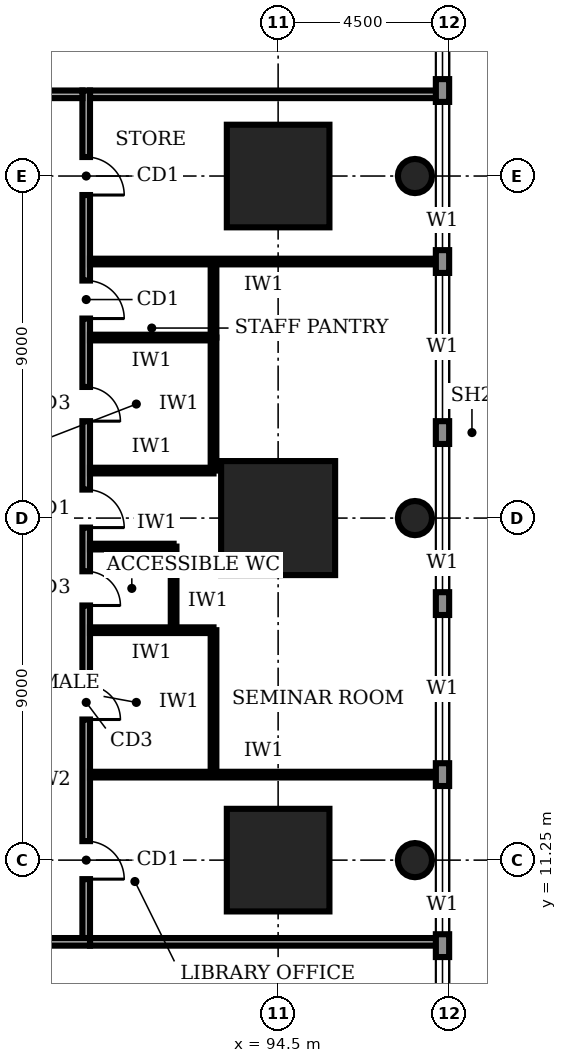
"""IFC4 building model, lengths in metres.
Left out: names, types, materials, properties, quantities, classifications, styles, units other than length and angle.
Written with IfcOpenShell. Run it as: python <this file> out.ifc"""

import sys

from ifc_helpers import new_model, si_unit, direction, frame, frame_2d, origin, origin_2d, place, context, subcontext, project, spatial, rectangle, circle, extrude, element, fill, save


model = new_model("IFC4")
c1 = context("Model", 3, precision=1e-05, world=origin(), true_north=direction((0.0, 1.0)))
c2 = subcontext(c1, "Body", "Model", "MODEL_VIEW")
j1 = project(units=[si_unit("LENGTHUNIT", "METRE"), si_unit("PLANEANGLEUNIT", "RADIAN")], contexts=[c1])
p1 = place(None, origin())
s1 = spatial("IfcSite", under=j1, at=p1, CompositionType="ELEMENT")
p2 = place(p1, origin())
s2 = spatial("IfcBuilding", under=s1, at=p2, CompositionType="ELEMENT")
p3 = place(p2, frame((0.0, 0.0, 11.0)))
s3 = spatial("IfcBuildingStorey", under=s2, at=p3, CompositionType="ELEMENT", Elevation=11.0)
p4 = place(p3, frame((94.5, 11.25, 0.0), z_axis=(0.0, 0.0, 1.0), x_axis=(1.0, 0.0, 0.0)))
e1 = element("IfcColumn", 1, at=p4, inside=s3, PredefinedType="COLUMN", context=c2, shape_type="SweptSolid", body=[
    extrude(rectangle(XDim=2.7, YDim=2.7, at=origin_2d()), origin(), (0.0, 0.0, 1.0), 5.0),
])
p5 = place(p3, frame((94.5, 20.25, 0.0), z_axis=(0.0, 0.0, 1.0), x_axis=(1.0, 0.0, 0.0)))
e2 = element("IfcColumn", 2, at=p5, inside=s3, PredefinedType="COLUMN", context=c2, shape_type="SweptSolid", body=[
    extrude(rectangle(XDim=3.0, YDim=3.0, at=origin_2d()), origin(), (0.0, 0.0, 1.0), 5.0),
])
p6 = place(p3, frame((94.5, 29.25, 0.0), z_axis=(0.0, 0.0, 1.0), x_axis=(1.0, 0.0, 0.0)))
e3 = element("IfcColumn", 3, at=p6, inside=s3, PredefinedType="COLUMN", context=c2, shape_type="SweptSolid", body=[
    extrude(rectangle(XDim=2.7, YDim=2.7, at=origin_2d()), origin(), (0.0, 0.0, 1.0), 5.0),
])
for number, where, z_axis, x_axis in (
    (4, (98.1, 11.25, 0.0), (0.0, 0.0, 1.0), (1.0, 0.0, 0.0)),
    (5, (98.1, 20.25, 0.0), (0.0, 0.0, 1.0), (1.0, 0.0, 0.0)),
    (6, (98.1, 29.25, 0.0), (0.0, 0.0, 1.0), (1.0, 0.0, 0.0)),
):
    element("IfcColumn", number, at=place(p3, frame(where, z_axis=z_axis, x_axis=x_axis)), inside=s3, PredefinedType="COLUMN", context=c2, shape_type="SweptSolid", body=[
        extrude(circle(Radius=0.45, at=origin_2d()), origin(), (0.0, 0.0, 1.0), 5.0),
    ])
p7 = place(p3, frame((98.825, -4.48, 0.0), z_axis=(0.0, 0.0, 1.0), x_axis=(0.0, 1.0, 0.0)))
e7 = element("IfcWall", 7, at=p7, inside=s3, PredefinedType="STANDARD", context=c2, shape_type="SweptSolid", body=[
    extrude(rectangle(XDim=53.96, YDim=0.35, at=frame_2d((26.98, 0.0))), origin(), (0.0, 0.0, 1.0), 4.7),
])
p8 = place(p7, frame((4.78, 0.0, 0.9)))
e8 = element("IfcOpeningElement", 8, at=p8, cuts=e7, PredefinedType="OPENING", context=c2, shape_type="SweptSolid", body=[
    extrude(rectangle(XDim=3.9, YDim=2.2, at=frame_2d((1.95, 1.1))), frame((0.0, 0.185, 0.0), z_axis=(0.0, -1.0, 0.0), x_axis=(1.0, 0.0, 0.0)), (0.0, 0.0, 1.0), 0.37),
])
p9 = place(p7, frame((9.28, 0.0, 0.9)))
e9 = element("IfcOpeningElement", 9, at=p9, cuts=e7, PredefinedType="OPENING", context=c2, shape_type="SweptSolid", body=[
    extrude(rectangle(XDim=3.9, YDim=2.2, at=frame_2d((1.95, 1.1))), frame((0.0, 0.185, 0.0), z_axis=(0.0, -1.0, 0.0), x_axis=(1.0, 0.0, 0.0)), (0.0, 0.0, 1.0), 0.37),
])
p10 = place(p7, frame((13.78, 0.0, 0.9)))
e10 = element("IfcOpeningElement", 10, at=p10, cuts=e7, PredefinedType="OPENING", context=c2, shape_type="SweptSolid", body=[
    extrude(rectangle(XDim=3.9, YDim=2.2, at=frame_2d((1.95, 1.1))), frame((0.0, 0.185, 0.0), z_axis=(0.0, -1.0, 0.0), x_axis=(1.0, 0.0, 0.0)), (0.0, 0.0, 1.0), 0.37),
])
p11 = place(p7, frame((18.28, 0.0, 0.9)))
e11 = element("IfcOpeningElement", 11, at=p11, cuts=e7, PredefinedType="OPENING", context=c2, shape_type="SweptSolid", body=[
    extrude(rectangle(XDim=3.9, YDim=2.2, at=frame_2d((1.95, 1.1))), frame((0.0, 0.185, 0.0), z_axis=(0.0, -1.0, 0.0), x_axis=(1.0, 0.0, 0.0)), (0.0, 0.0, 1.0), 0.37),
])
p12 = place(p7, frame((22.78, 0.0, 0.9)))
e12 = element("IfcOpeningElement", 12, at=p12, cuts=e7, PredefinedType="OPENING", context=c2, shape_type="SweptSolid", body=[
    extrude(rectangle(XDim=3.9, YDim=2.2, at=frame_2d((1.95, 1.1))), frame((0.0, 0.185, 0.0), z_axis=(0.0, -1.0, 0.0), x_axis=(1.0, 0.0, 0.0)), (0.0, 0.0, 1.0), 0.37),
])
p13 = place(p7, frame((27.28, 0.0, 0.9)))
e13 = element("IfcOpeningElement", 13, at=p13, cuts=e7, PredefinedType="OPENING", context=c2, shape_type="SweptSolid", body=[
    extrude(rectangle(XDim=3.9, YDim=2.2, at=frame_2d((1.95, 1.1))), frame((0.0, 0.185, 0.0), z_axis=(0.0, -1.0, 0.0), x_axis=(1.0, 0.0, 0.0)), (0.0, 0.0, 1.0), 0.37),
])
p14 = place(p7, frame((31.78, 0.0, 0.9)))
e14 = element("IfcOpeningElement", 14, at=p14, cuts=e7, PredefinedType="OPENING", context=c2, shape_type="SweptSolid", body=[
    extrude(rectangle(XDim=3.9, YDim=2.2, at=frame_2d((1.95, 1.1))), frame((0.0, 0.185, 0.0), z_axis=(0.0, -1.0, 0.0), x_axis=(1.0, 0.0, 0.0)), (0.0, 0.0, 1.0), 0.37),
])
p15 = place(p7, frame((36.28, 0.0, 0.9)))
e15 = element("IfcOpeningElement", 15, at=p15, cuts=e7, PredefinedType="OPENING", context=c2, shape_type="SweptSolid", body=[
    extrude(rectangle(XDim=3.9, YDim=2.2, at=frame_2d((1.95, 1.1))), frame((0.0, 0.185, 0.0), z_axis=(0.0, -1.0, 0.0), x_axis=(1.0, 0.0, 0.0)), (0.0, 0.0, 1.0), 0.37),
])
p16 = place(p7, frame((40.78, 0.0, 0.9)))
e16 = element("IfcOpeningElement", 16, at=p16, cuts=e7, PredefinedType="OPENING", context=c2, shape_type="SweptSolid", body=[
    extrude(rectangle(XDim=3.9, YDim=2.2, at=frame_2d((1.95, 1.1))), frame((0.0, 0.185, 0.0), z_axis=(0.0, -1.0, 0.0), x_axis=(1.0, 0.0, 0.0)), (0.0, 0.0, 1.0), 0.37),
])
p17 = place(p7, frame((45.28, 0.0, 0.9)))
e17 = element("IfcOpeningElement", 17, at=p17, cuts=e7, PredefinedType="OPENING", context=c2, shape_type="SweptSolid", body=[
    extrude(rectangle(XDim=3.9, YDim=2.2, at=frame_2d((1.95, 1.1))), frame((0.0, 0.185, 0.0), z_axis=(0.0, -1.0, 0.0), x_axis=(1.0, 0.0, 0.0)), (0.0, 0.0, 1.0), 0.37),
])
p18 = place(p7, frame((49.71, 0.0, 0.9)))
e18 = element("IfcOpeningElement", 18, at=p18, cuts=e7, PredefinedType="OPENING", context=c2, shape_type="SweptSolid", body=[
    extrude(rectangle(XDim=3.9, YDim=2.2, at=frame_2d((1.95, 1.1))), frame((0.0, 0.185, 0.0), z_axis=(0.0, -1.0, 0.0), x_axis=(1.0, 0.0, 0.0)), (0.0, 0.0, 1.0), 0.37),
])
p19 = place(p3, frame((72.65, 9.1, 0.0), z_axis=(0.0, 0.0, 1.0), x_axis=(1.0, 0.0, 0.0)))
e19 = element("IfcWall", 19, at=p19, inside=s3, PredefinedType="SOLIDWALL", context=c2, shape_type="SweptSolid", body=[
    extrude(rectangle(XDim=16.9, YDim=0.2, at=frame_2d((8.45, 0.0))), origin(), (0.0, 0.0, 1.0), 4.7),
])
p20 = place(p19, frame((3.175, 0.0, 0.0)))
e20 = element("IfcOpeningElement", 20, at=p20, cuts=e19, PredefinedType="OPENING", context=c2, shape_type="SweptSolid", body=[
    extrude(rectangle(XDim=1.8, YDim=2.1, at=frame_2d((0.9, 1.05))), frame((0.0, 0.11, 0.0), z_axis=(0.0, -1.0, 0.0), x_axis=(1.0, 0.0, 0.0)), (0.0, 0.0, 1.0), 0.22),
])
p21 = place(p19, frame((10.1, 0.0, 0.0)))
e21 = element("IfcOpeningElement", 21, at=p21, cuts=e19, PredefinedType="OPENING", context=c2, shape_type="SweptSolid", body=[
    extrude(rectangle(XDim=1.0, YDim=2.1, at=frame_2d((0.5, 1.05))), frame((0.0, 0.11, 0.0), z_axis=(0.0, -1.0, 0.0), x_axis=(1.0, 0.0, 0.0)), (0.0, 0.0, 1.0), 0.22),
])
p22 = place(p19, frame((13.975, 0.0, 0.0)))
e22 = element("IfcOpeningElement", 22, at=p22, cuts=e19, PredefinedType="OPENING", context=c2, shape_type="SweptSolid", body=[
    extrude(rectangle(XDim=1.8, YDim=2.1, at=frame_2d((0.9, 1.05))), frame((0.0, 0.11, 0.0), z_axis=(0.0, -1.0, 0.0), x_axis=(1.0, 0.0, 0.0)), (0.0, 0.0, 1.0), 0.22),
])
p23 = place(p3, frame((89.45, 9.2, 0.0), z_axis=(0.0, 0.0, 1.0), x_axis=(0.0, 1.0, 0.0)))
e23 = element("IfcWall", 23, at=p23, inside=s3, PredefinedType="SOLIDWALL", context=c2, shape_type="SweptSolid", body=[
    extrude(rectangle(XDim=22.3, YDim=0.2, at=frame_2d((11.15, 0.0))), origin(), (0.0, 0.0, 1.0), 4.7),
])
p24 = place(p23, frame((1.55, 0.0, 0.0)))
e24 = element("IfcOpeningElement", 24, at=p24, cuts=e23, PredefinedType="OPENING", context=c2, shape_type="SweptSolid", body=[
    extrude(rectangle(XDim=1.0, YDim=2.1, at=frame_2d((0.5, 1.05))), frame((0.0, 0.11, 0.0), z_axis=(0.0, -1.0, 0.0), x_axis=(1.0, 0.0, 0.0)), (0.0, 0.0, 1.0), 0.22),
])
p25 = place(p23, frame((5.75, 0.0, 0.0)))
e25 = element("IfcOpeningElement", 25, at=p25, cuts=e23, PredefinedType="OPENING", context=c2, shape_type="SweptSolid", body=[
    extrude(rectangle(XDim=0.9, YDim=2.1, at=frame_2d((0.45, 1.05))), frame((0.0, 0.11, 0.0), z_axis=(0.0, -1.0, 0.0), x_axis=(1.0, 0.0, 0.0)), (0.0, 0.0, 1.0), 0.22),
])
p26 = place(p23, frame((8.75, 0.0, 0.0)))
e26 = element("IfcOpeningElement", 26, at=p26, cuts=e23, PredefinedType="OPENING", context=c2, shape_type="SweptSolid", body=[
    extrude(rectangle(XDim=0.9, YDim=2.1, at=frame_2d((0.45, 1.05))), frame((0.0, 0.11, 0.0), z_axis=(0.0, -1.0, 0.0), x_axis=(1.0, 0.0, 0.0)), (0.0, 0.0, 1.0), 0.22),
])
p27 = place(p23, frame((13.6, 0.0, 0.0)))
e27 = element("IfcOpeningElement", 27, at=p27, cuts=e23, PredefinedType="OPENING", context=c2, shape_type="SweptSolid", body=[
    extrude(rectangle(XDim=0.9, YDim=2.1, at=frame_2d((0.45, 1.05))), frame((0.0, 0.11, 0.0), z_axis=(0.0, -1.0, 0.0), x_axis=(1.0, 0.0, 0.0)), (0.0, 0.0, 1.0), 0.22),
])
p28 = place(p23, frame((16.3, 0.0, 0.0)))
e28 = element("IfcOpeningElement", 28, at=p28, cuts=e23, PredefinedType="OPENING", context=c2, shape_type="SweptSolid", body=[
    extrude(rectangle(XDim=1.0, YDim=2.1, at=frame_2d((0.5, 1.05))), frame((0.0, 0.11, 0.0), z_axis=(0.0, -1.0, 0.0), x_axis=(1.0, 0.0, 0.0)), (0.0, 0.0, 1.0), 0.22),
])
p29 = place(p23, frame((10.8, 0.0, 0.0)))
e29 = element("IfcOpeningElement", 29, at=p29, cuts=e23, PredefinedType="OPENING", context=c2, shape_type="SweptSolid", body=[
    extrude(rectangle(XDim=1.0, YDim=2.1, at=frame_2d((0.5, 1.05))), frame((0.0, 0.11, 0.0), z_axis=(0.0, -1.0, 0.0), x_axis=(1.0, 0.0, 0.0)), (0.0, 0.0, 1.0), 0.22),
])
p30 = place(p23, frame((19.55, 0.0, 0.0)))
e30 = element("IfcOpeningElement", 30, at=p30, cuts=e23, PredefinedType="OPENING", context=c2, shape_type="SweptSolid", body=[
    extrude(rectangle(XDim=1.0, YDim=2.1, at=frame_2d((0.5, 1.05))), frame((0.0, 0.11, 0.0), z_axis=(0.0, -1.0, 0.0), x_axis=(1.0, 0.0, 0.0)), (0.0, 0.0, 1.0), 0.22),
])
p31 = place(p3, frame((89.35, 31.4, 0.0), z_axis=(0.0, 0.0, 1.0), x_axis=(-1.0, 0.0, 0.0)))
e31 = element("IfcWall", 31, at=p31, inside=s3, PredefinedType="SOLIDWALL", context=c2, shape_type="SweptSolid", body=[
    extrude(rectangle(XDim=16.9, YDim=0.2, at=frame_2d((8.45, 0.0))), origin(), (0.0, 0.0, 1.0), 4.7),
])
p32 = place(p31, frame((13.925, 0.0, 0.0)))
e32 = element("IfcOpeningElement", 32, at=p32, cuts=e31, PredefinedType="OPENING", context=c2, shape_type="SweptSolid", body=[
    extrude(rectangle(XDim=1.8, YDim=2.1, at=frame_2d((0.9, 1.05))), frame((0.0, 0.11, 0.0), z_axis=(0.0, -1.0, 0.0), x_axis=(1.0, 0.0, 0.0)), (0.0, 0.0, 1.0), 0.22),
])
p33 = place(p31, frame((10.1, 0.0, 0.0)))
e33 = element("IfcOpeningElement", 33, at=p33, cuts=e31, PredefinedType="OPENING", context=c2, shape_type="SweptSolid", body=[
    extrude(rectangle(XDim=1.0, YDim=2.1, at=frame_2d((0.5, 1.05))), frame((0.0, 0.11, 0.0), z_axis=(0.0, -1.0, 0.0), x_axis=(1.0, 0.0, 0.0)), (0.0, 0.0, 1.0), 0.22),
])
p34 = place(p31, frame((0.925, 0.0, 0.0)))
e34 = element("IfcOpeningElement", 34, at=p34, cuts=e31, PredefinedType="OPENING", context=c2, shape_type="SweptSolid", body=[
    extrude(rectangle(XDim=1.8, YDim=2.1, at=frame_2d((0.9, 1.05))), frame((0.0, 0.11, 0.0), z_axis=(0.0, -1.0, 0.0), x_axis=(1.0, 0.0, 0.0)), (0.0, 0.0, 1.0), 0.22),
])
p35 = place(p31, frame((5.6, 0.0, 0.0)))
e35 = element("IfcOpeningElement", 35, at=p35, cuts=e31, PredefinedType="OPENING", context=c2, shape_type="SweptSolid", body=[
    extrude(rectangle(XDim=1.0, YDim=2.1, at=frame_2d((0.5, 1.05))), frame((0.0, 0.11, 0.0), z_axis=(0.0, -1.0, 0.0), x_axis=(1.0, 0.0, 0.0)), (0.0, 0.0, 1.0), 0.22),
])
for number, where, z_axis, x_axis in (
    (36, (89.55, 9.1, 0.0), (0.0, 0.0, 1.0), (1.0, 0.0, 0.0)),
    (37, (89.55, 31.4, 0.0), (0.0, 0.0, 1.0), (1.0, 0.0, 0.0)),
):
    element("IfcWall", number, at=place(p3, frame(where, z_axis=z_axis, x_axis=x_axis)), inside=s3, PredefinedType="SOLIDWALL", context=c2, shape_type="SweptSolid", body=[
        extrude(rectangle(XDim=9.15, YDim=0.2, at=frame_2d((4.575, 0.0))), origin(), (0.0, 0.0, 1.0), 4.7),
    ])
for number, where, z_axis, x_axis in (
    (38, (89.55, 13.5, 0.0), (0.0, 0.0, 1.0), (1.0, 0.0, 0.0)),
    (39, (89.55, 27.0, 0.0), (0.0, 0.0, 1.0), (1.0, 0.0, 0.0)),
):
    element("IfcWall", number, at=place(p3, frame(where, z_axis=z_axis, x_axis=x_axis)), inside=s3, PredefinedType="PARTITIONING", context=c2, shape_type="SweptSolid", body=[
        extrude(rectangle(XDim=9.15, YDim=0.15, at=frame_2d((4.575, 0.0))), origin(), (0.0, 0.0, 1.0), 4.7),
    ])
p36 = place(p3, frame((89.55, 17.3, 0.0), z_axis=(0.0, 0.0, 1.0), x_axis=(1.0, 0.0, 0.0)))
e40 = element("IfcWall", 40, at=p36, inside=s3, PredefinedType="PARTITIONING", context=c2, shape_type="SweptSolid", body=[
    extrude(rectangle(XDim=3.25, YDim=0.15, at=frame_2d((1.625, 0.0))), origin(), (0.0, 0.0, 1.0), 4.7),
])
p37 = place(p3, frame((89.55, 19.5, 0.0), z_axis=(0.0, 0.0, 1.0), x_axis=(1.0, 0.0, 0.0)))
e41 = element("IfcWall", 41, at=p37, inside=s3, PredefinedType="PARTITIONING", context=c2, shape_type="SweptSolid", body=[
    extrude(rectangle(XDim=2.2, YDim=0.15, at=frame_2d((1.1, 0.0))), origin(), (0.0, 0.0, 1.0), 4.7),
])
for number, where, z_axis, x_axis in (
    (42, (89.55, 21.5, 0.0), (0.0, 0.0, 1.0), (1.0, 0.0, 0.0)),
    (43, (89.55, 25.0, 0.0), (0.0, 0.0, 1.0), (1.0, 0.0, 0.0)),
):
    element("IfcWall", number, at=place(p3, frame(where, z_axis=z_axis, x_axis=x_axis)), inside=s3, PredefinedType="PARTITIONING", context=c2, shape_type="SweptSolid", body=[
        extrude(rectangle(XDim=3.25, YDim=0.15, at=frame_2d((1.625, 0.0))), origin(), (0.0, 0.0, 1.0), 4.7),
    ])
p38 = place(p3, frame((92.8, 13.5, 0.0), z_axis=(0.0, 0.0, 1.0), x_axis=(0.0, 1.0, 0.0)))
e44 = element("IfcWall", 44, at=p38, inside=s3, PredefinedType="PARTITIONING", context=c2, shape_type="SweptSolid", body=[
    extrude(rectangle(XDim=3.8, YDim=0.15, at=frame_2d((1.9, 0.0))), origin(), (0.0, 0.0, 1.0), 4.7),
])
p39 = place(p3, frame((91.75, 17.3, 0.0), z_axis=(0.0, 0.0, 1.0), x_axis=(0.0, 1.0, 0.0)))
e45 = element("IfcWall", 45, at=p39, inside=s3, PredefinedType="PARTITIONING", context=c2, shape_type="SweptSolid", body=[
    extrude(rectangle(XDim=2.2, YDim=0.15, at=frame_2d((1.1, 0.0))), origin(), (0.0, 0.0, 1.0), 4.7),
])
p40 = place(p3, frame((92.8, 21.5, 0.0), z_axis=(0.0, 0.0, 1.0), x_axis=(0.0, 1.0, 0.0)))
e46 = element("IfcWall", 46, at=p40, inside=s3, PredefinedType="PARTITIONING", context=c2, shape_type="SweptSolid", body=[
    extrude(rectangle(XDim=3.5, YDim=0.15, at=frame_2d((1.75, 0.0))), origin(), (0.0, 0.0, 1.0), 4.7),
])
p41 = place(p3, frame((92.8, 25.0, 0.0), z_axis=(0.0, 0.0, 1.0), x_axis=(0.0, 1.0, 0.0)))
e47 = element("IfcWall", 47, at=p41, inside=s3, PredefinedType="PARTITIONING", context=c2, shape_type="SweptSolid", body=[
    extrude(rectangle(XDim=2.0, YDim=0.15, at=frame_2d((1.0, 0.0))), origin(), (0.0, 0.0, 1.0), 4.7),
])
p42 = place(p9, origin())
e48 = element("IfcWindow", 48, at=p42, inside=s3, PartitioningType="SINGLE_PANEL", PredefinedType="WINDOW", context=c2, shape_type="SweptSolid", body=[
    extrude(rectangle(XDim=3.9, YDim=2.2, at=frame_2d((1.95, 1.1))), frame((0.0, 0.03, 0.0), z_axis=(0.0, -1.0, 0.0), x_axis=(1.0, 0.0, 0.0)), (0.0, 0.0, 1.0), 0.06),
])
fill(e9, e48)
p43 = place(p10, origin())
e49 = element("IfcWindow", 49, at=p43, inside=s3, PartitioningType="SINGLE_PANEL", PredefinedType="WINDOW", context=c2, shape_type="SweptSolid", body=[
    extrude(rectangle(XDim=3.9, YDim=2.2, at=frame_2d((1.95, 1.1))), frame((0.0, 0.03, 0.0), z_axis=(0.0, -1.0, 0.0), x_axis=(1.0, 0.0, 0.0)), (0.0, 0.0, 1.0), 0.06),
])
fill(e10, e49)
p44 = place(p11, origin())
e50 = element("IfcWindow", 50, at=p44, inside=s3, PartitioningType="SINGLE_PANEL", PredefinedType="WINDOW", context=c2, shape_type="SweptSolid", body=[
    extrude(rectangle(XDim=3.9, YDim=2.2, at=frame_2d((1.95, 1.1))), frame((0.0, 0.03, 0.0), z_axis=(0.0, -1.0, 0.0), x_axis=(1.0, 0.0, 0.0)), (0.0, 0.0, 1.0), 0.06),
])
fill(e11, e50)
p45 = place(p12, origin())
e51 = element("IfcWindow", 51, at=p45, inside=s3, PartitioningType="SINGLE_PANEL", PredefinedType="WINDOW", context=c2, shape_type="SweptSolid", body=[
    extrude(rectangle(XDim=3.9, YDim=2.2, at=frame_2d((1.95, 1.1))), frame((0.0, 0.03, 0.0), z_axis=(0.0, -1.0, 0.0), x_axis=(1.0, 0.0, 0.0)), (0.0, 0.0, 1.0), 0.06),
])
fill(e12, e51)
p46 = place(p13, origin())
e52 = element("IfcWindow", 52, at=p46, inside=s3, PartitioningType="SINGLE_PANEL", PredefinedType="WINDOW", context=c2, shape_type="SweptSolid", body=[
    extrude(rectangle(XDim=3.9, YDim=2.2, at=frame_2d((1.95, 1.1))), frame((0.0, 0.03, 0.0), z_axis=(0.0, -1.0, 0.0), x_axis=(1.0, 0.0, 0.0)), (0.0, 0.0, 1.0), 0.06),
])
fill(e13, e52)
p47 = place(p14, origin())
e53 = element("IfcWindow", 53, at=p47, inside=s3, PartitioningType="SINGLE_PANEL", PredefinedType="WINDOW", context=c2, shape_type="SweptSolid", body=[
    extrude(rectangle(XDim=3.9, YDim=2.2, at=frame_2d((1.95, 1.1))), frame((0.0, 0.03, 0.0), z_axis=(0.0, -1.0, 0.0), x_axis=(1.0, 0.0, 0.0)), (0.0, 0.0, 1.0), 0.06),
])
fill(e14, e53)
p48 = place(p15, origin())
e54 = element("IfcWindow", 54, at=p48, inside=s3, PartitioningType="SINGLE_PANEL", PredefinedType="WINDOW", context=c2, shape_type="SweptSolid", body=[
    extrude(rectangle(XDim=3.9, YDim=2.2, at=frame_2d((1.95, 1.1))), frame((0.0, 0.03, 0.0), z_axis=(0.0, -1.0, 0.0), x_axis=(1.0, 0.0, 0.0)), (0.0, 0.0, 1.0), 0.06),
])
fill(e15, e54)
p49 = place(p24, frame((1.0, 0.0, 0.0), z_axis=(0.0, 0.0, 1.0), x_axis=(-1.0, 0.0, 0.0)))
e55 = element("IfcDoor", 55, at=p49, inside=s3, OperationType="SINGLE_SWING_RIGHT", PredefinedType="DOOR", context=c2, shape_type="SweptSolid", body=[
    extrude(rectangle(XDim=1.0, YDim=2.1, at=frame_2d((0.5, 1.05))), frame((0.0, 0.025, 0.0), z_axis=(0.0, -1.0, 0.0), x_axis=(1.0, 0.0, 0.0)), (0.0, 0.0, 1.0), 0.05),
])
fill(e24, e55)
p50 = place(p25, frame((0.9, 0.0, 0.0), z_axis=(0.0, 0.0, 1.0), x_axis=(-1.0, 0.0, 0.0)))
e56 = element("IfcDoor", 56, at=p50, inside=s3, OperationType="SINGLE_SWING_RIGHT", PredefinedType="DOOR", context=c2, shape_type="SweptSolid", body=[
    extrude(rectangle(XDim=0.9, YDim=2.1, at=frame_2d((0.45, 1.05))), frame((0.0, 0.025, 0.0), z_axis=(0.0, -1.0, 0.0), x_axis=(1.0, 0.0, 0.0)), (0.0, 0.0, 1.0), 0.05),
])
fill(e25, e56)
p51 = place(p26, frame((0.9, 0.0, 0.0), z_axis=(0.0, 0.0, 1.0), x_axis=(-1.0, 0.0, 0.0)))
e57 = element("IfcDoor", 57, at=p51, inside=s3, OperationType="SINGLE_SWING_RIGHT", PredefinedType="DOOR", context=c2, shape_type="SweptSolid", body=[
    extrude(rectangle(XDim=0.9, YDim=2.1, at=frame_2d((0.45, 1.05))), frame((0.0, 0.025, 0.0), z_axis=(0.0, -1.0, 0.0), x_axis=(1.0, 0.0, 0.0)), (0.0, 0.0, 1.0), 0.05),
])
fill(e26, e57)
p52 = place(p27, frame((0.9, 0.0, 0.0), z_axis=(0.0, 0.0, 1.0), x_axis=(-1.0, 0.0, 0.0)))
e58 = element("IfcDoor", 58, at=p52, inside=s3, OperationType="SINGLE_SWING_RIGHT", PredefinedType="DOOR", context=c2, shape_type="SweptSolid", body=[
    extrude(rectangle(XDim=0.9, YDim=2.1, at=frame_2d((0.45, 1.05))), frame((0.0, 0.025, 0.0), z_axis=(0.0, -1.0, 0.0), x_axis=(1.0, 0.0, 0.0)), (0.0, 0.0, 1.0), 0.05),
])
fill(e27, e58)
p53 = place(p28, frame((1.0, 0.0, 0.0), z_axis=(0.0, 0.0, 1.0), x_axis=(-1.0, 0.0, 0.0)))
e59 = element("IfcDoor", 59, at=p53, inside=s3, OperationType="SINGLE_SWING_RIGHT", PredefinedType="DOOR", context=c2, shape_type="SweptSolid", body=[
    extrude(rectangle(XDim=1.0, YDim=2.1, at=frame_2d((0.5, 1.05))), frame((0.0, 0.025, 0.0), z_axis=(0.0, -1.0, 0.0), x_axis=(1.0, 0.0, 0.0)), (0.0, 0.0, 1.0), 0.05),
])
fill(e28, e59)
p54 = place(p29, frame((1.0, 0.0, 0.0), z_axis=(0.0, 0.0, 1.0), x_axis=(-1.0, 0.0, 0.0)))
e60 = element("IfcDoor", 60, at=p54, inside=s3, OperationType="SINGLE_SWING_RIGHT", PredefinedType="DOOR", context=c2, shape_type="SweptSolid", body=[
    extrude(rectangle(XDim=1.0, YDim=2.1, at=frame_2d((0.5, 1.05))), frame((0.0, 0.025, 0.0), z_axis=(0.0, -1.0, 0.0), x_axis=(1.0, 0.0, 0.0)), (0.0, 0.0, 1.0), 0.05),
])
fill(e29, e60)
p55 = place(p30, frame((1.0, 0.0, 0.0), z_axis=(0.0, 0.0, 1.0), x_axis=(-1.0, 0.0, 0.0)))
e61 = element("IfcDoor", 61, at=p55, inside=s3, OperationType="SINGLE_SWING_RIGHT", PredefinedType="DOOR", context=c2, shape_type="SweptSolid", body=[
    extrude(rectangle(XDim=1.0, YDim=2.1, at=frame_2d((0.5, 1.05))), frame((0.0, 0.025, 0.0), z_axis=(0.0, -1.0, 0.0), x_axis=(1.0, 0.0, 0.0)), (0.0, 0.0, 1.0), 0.05),
])
fill(e30, e61)
save(model, sys.argv[1])
